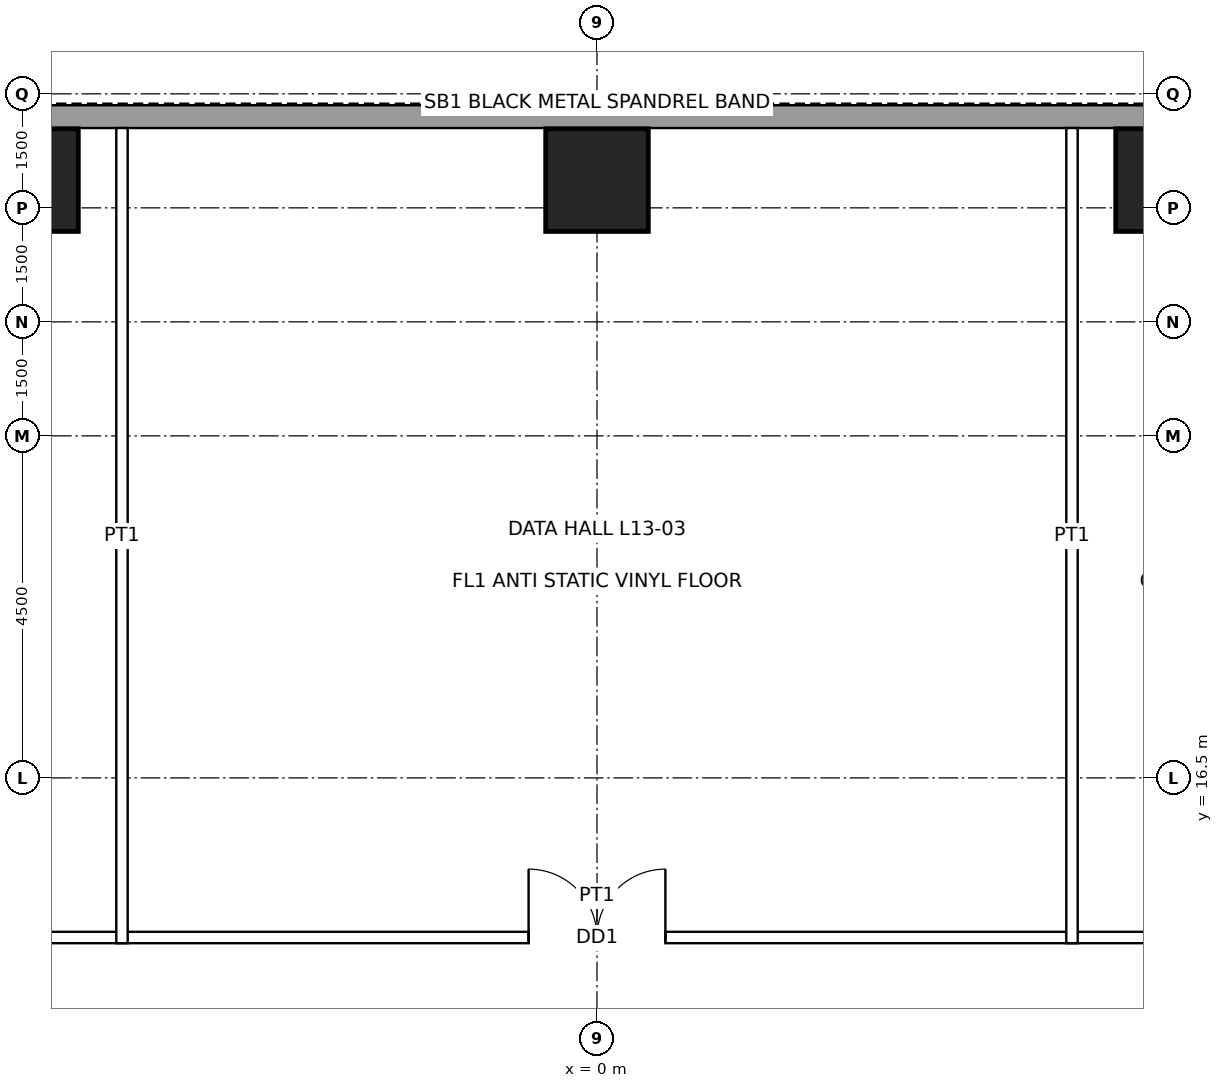
"""IFC4 building model, lengths in metres.
Left out: names, types, materials, properties, quantities, classifications, styles, units other than length and angle.
Written with IfcOpenShell. Run it as: python <this file> out.ifc"""

import sys

from ifc_helpers import new_model, si_unit, direction, frame, frame_2d, origin, origin_2d, place, context, subcontext, project, spatial, rectangle, hollow_rectangle, extrude, element, fill, save


model = new_model("IFC4")
c1 = context("Model", 3, precision=1e-05, world=origin(), true_north=direction((0.0, 1.0)))
c2 = subcontext(c1, "Body", "Model", "MODEL_VIEW")
j1 = project(units=[si_unit("LENGTHUNIT", "METRE"), si_unit("PLANEANGLEUNIT", "RADIAN")], contexts=[c1])
p1 = place(None, origin())
s1 = spatial("IfcSite", under=j1, at=p1, CompositionType="ELEMENT")
p2 = place(p1, origin())
s2 = spatial("IfcBuilding", under=s1, at=p2, CompositionType="ELEMENT")
p3 = place(p2, frame((0.0, 0.0, 68.4)))
s3 = spatial("IfcBuildingStorey", under=s2, at=p3, CompositionType="ELEMENT", Elevation=68.4)
for number, where, z_axis, x_axis in (
    (1, (-7.5, 24.365, 0.0), (0.0, 0.0, 1.0), (1.0, 0.0, 0.0)),
    (2, (0.0, 24.365, 0.0), (0.0, 0.0, 1.0), (1.0, 0.0, 0.0)),
    (3, (7.5, 24.365, 0.0), (0.0, 0.0, 1.0), (1.0, 0.0, 0.0)),
):
    element("IfcColumn", number, at=place(p3, frame(where, z_axis=z_axis, x_axis=x_axis)), inside=s3, PredefinedType="COLUMN", context=c2, shape_type="SweptSolid", body=[
        extrude(hollow_rectangle(XDim=1.35, YDim=1.35, WallThickness=0.085, at=origin_2d()), origin(), (0.0, 0.0, 1.0), 5.0),
    ])
p4 = place(p3, frame((-17.7, 25.2, 0.0), z_axis=(0.0, 0.0, 1.0), x_axis=(1.0, 0.0, 0.0)))
e4 = element("IfcWall", 4, at=p4, inside=s3, PredefinedType="SOLIDWALL", context=c2, shape_type="SweptSolid", body=[
    extrude(rectangle(XDim=35.4, YDim=0.3, at=frame_2d((17.7, 0.0))), origin(), (0.0, 0.0, 1.0), 4.8),
])
p5 = place(p3, frame((-14.475, 14.4, 0.0), z_axis=(0.0, 0.0, 1.0), x_axis=(1.0, 0.0, 0.0)))
e5 = element("IfcWall", 5, at=p5, inside=s3, PredefinedType="PARTITIONING", context=c2, shape_type="SweptSolid", body=[
    extrude(rectangle(XDim=28.95, YDim=0.15, at=frame_2d((14.475, 0.0))), origin(), (0.0, 0.0, 1.0), 4.8),
])
p6 = place(p5, frame((4.825, 0.0, 0.0)))
e6 = element("IfcOpeningElement", 6, at=p6, cuts=e5, PredefinedType="OPENING", context=c2, shape_type="SweptSolid", body=[
    extrude(rectangle(XDim=1.8, YDim=2.4, at=frame_2d((0.9, 1.2))), frame((0.0, 0.085, 0.0), z_axis=(0.0, -1.0, 0.0), x_axis=(1.0, 0.0, 0.0)), (0.0, 0.0, 1.0), 0.17),
])
p7 = place(p5, frame((13.575, 0.0, 0.0)))
e7 = element("IfcOpeningElement", 7, at=p7, cuts=e5, PredefinedType="OPENING", context=c2, shape_type="SweptSolid", body=[
    extrude(rectangle(XDim=1.8, YDim=2.4, at=frame_2d((0.9, 1.2))), frame((0.0, 0.085, 0.0), z_axis=(0.0, -1.0, 0.0), x_axis=(1.0, 0.0, 0.0)), (0.0, 0.0, 1.0), 0.17),
])
p8 = place(p5, frame((22.725, 0.0, 0.0)))
e8 = element("IfcOpeningElement", 8, at=p8, cuts=e5, PredefinedType="OPENING", context=c2, shape_type="SweptSolid", body=[
    extrude(rectangle(XDim=1.0, YDim=2.1, at=frame_2d((0.5, 1.05))), frame((0.0, 0.085, 0.0), z_axis=(0.0, -1.0, 0.0), x_axis=(1.0, 0.0, 0.0)), (0.0, 0.0, 1.0), 0.17),
])
p9 = place(p5, frame((26.8, 0.0, 0.0)))
e9 = element("IfcOpeningElement", 9, at=p9, cuts=e5, PredefinedType="OPENING", context=c2, shape_type="SweptSolid", body=[
    extrude(rectangle(XDim=1.0, YDim=2.1, at=frame_2d((0.5, 1.05))), frame((0.0, 0.085, 0.0), z_axis=(0.0, -1.0, 0.0), x_axis=(1.0, 0.0, 0.0)), (0.0, 0.0, 1.0), 0.17),
])
p10 = place(p5, frame((1.15, 0.0, 0.0)))
e10 = element("IfcOpeningElement", 10, at=p10, cuts=e5, PredefinedType="OPENING", context=c2, shape_type="SweptSolid", body=[
    extrude(rectangle(XDim=1.0, YDim=2.1, at=frame_2d((0.5, 1.05))), frame((0.0, 0.085, 0.0), z_axis=(0.0, -1.0, 0.0), x_axis=(1.0, 0.0, 0.0)), (0.0, 0.0, 1.0), 0.17),
])
for number, where, z_axis, x_axis in (
    (11, (-6.25, 14.325, 0.0), (0.0, 0.0, 1.0), (0.0, 1.0, 0.0)),
    (12, (6.25, 14.325, 0.0), (0.0, 0.0, 1.0), (0.0, 1.0, 0.0)),
):
    element("IfcWall", number, at=place(p3, frame(where, z_axis=z_axis, x_axis=x_axis)), inside=s3, PredefinedType="PARTITIONING", context=c2, shape_type="SweptSolid", body=[
        extrude(rectangle(XDim=10.725, YDim=0.15, at=frame_2d((5.363, 0.0))), origin(), (0.0, 0.0, 1.0), 4.8),
    ])
p11 = place(p7, origin())
e13 = element("IfcDoor", 13, at=p11, inside=s3, OperationType="DOUBLE_DOOR_SINGLE_SWING", PredefinedType="DOOR", context=c2, shape_type="SweptSolid", body=[
    extrude(rectangle(XDim=1.8, YDim=2.4, at=frame_2d((0.9, 1.2))), frame((0.0, 0.025, 0.0), z_axis=(0.0, -1.0, 0.0), x_axis=(1.0, 0.0, 0.0)), (0.0, 0.0, 1.0), 0.05),
])
fill(e7, e13)
save(model, sys.argv[1])
